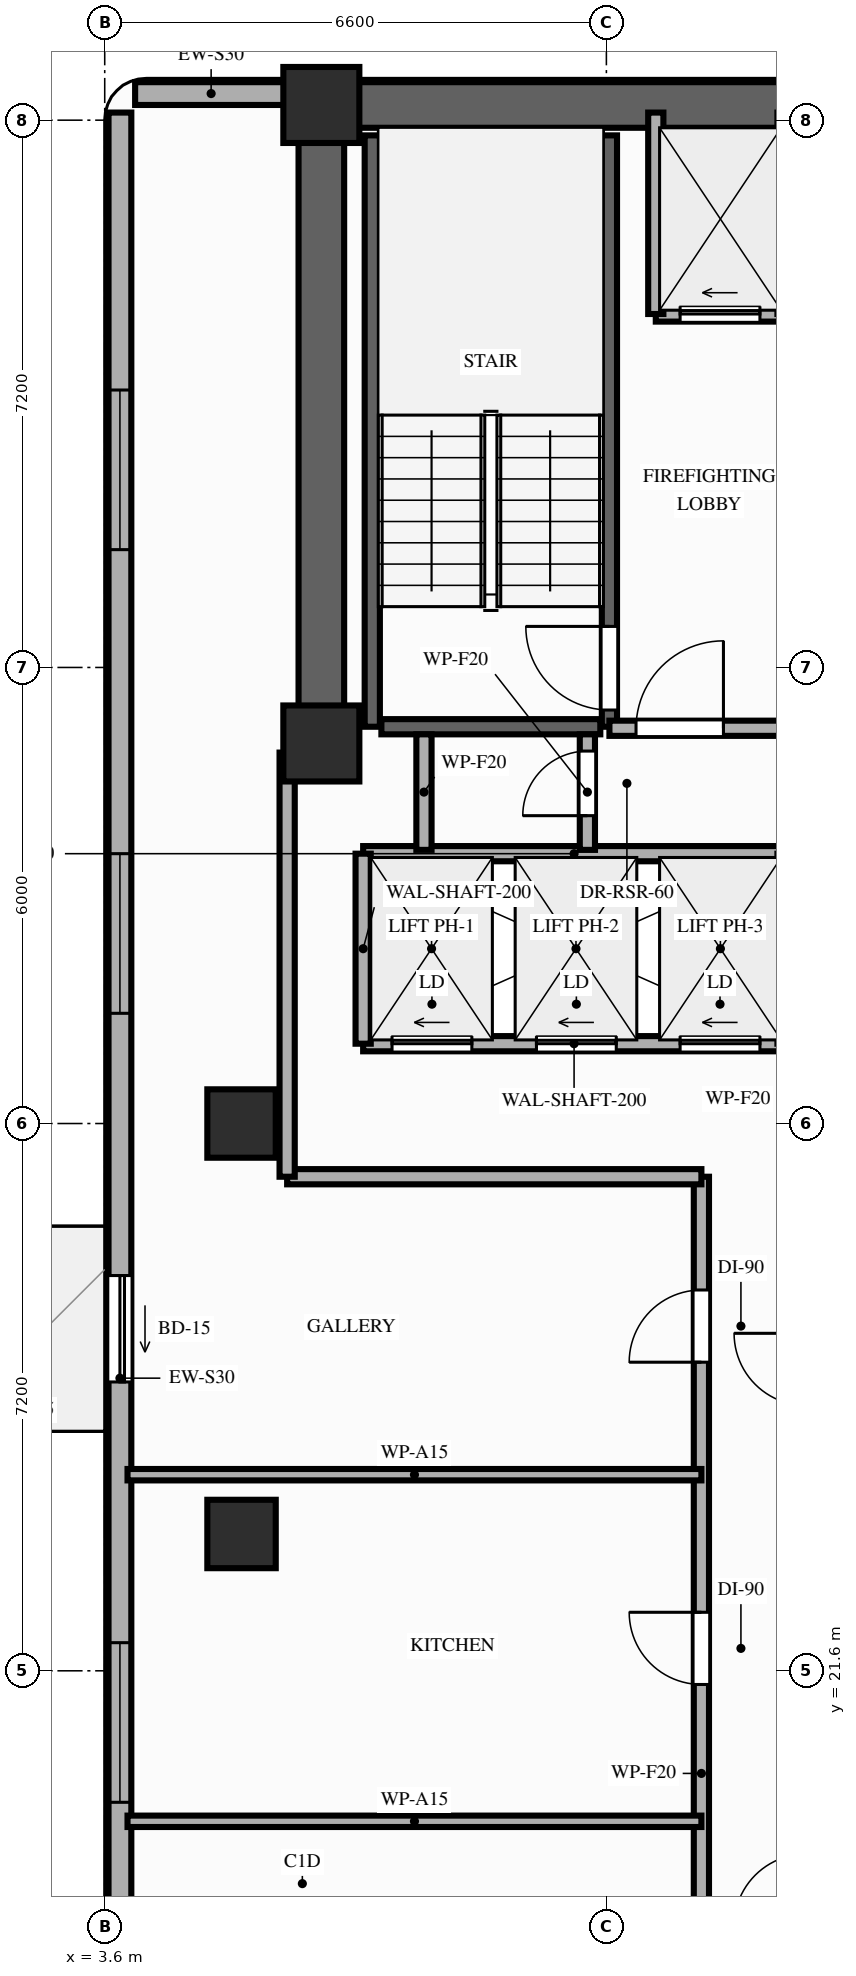
"""IFC4 building model, lengths in metres.
Left out: names, types, materials, properties, quantities, classifications, styles, units other than length and angle.
Written with IfcOpenShell. Run it as: python <this file> out.ifc"""

import sys

from ifc_helpers import new_model, si_unit, direction, frame, frame_2d, origin, origin_2d, place, context, subcontext, project, spatial, rectangle, extrude, element, fill, save


model = new_model("IFC4")
c1 = context("Model", 3, precision=1e-05, world=origin(), true_north=direction((0.0, 1.0)))
c2 = subcontext(c1, "Body", "Model", "MODEL_VIEW")
j1 = project(units=[si_unit("LENGTHUNIT", "METRE"), si_unit("PLANEANGLEUNIT", "RADIAN")], contexts=[c1])
p1 = place(None, origin())
s1 = spatial("IfcSite", under=j1, at=p1, CompositionType="ELEMENT")
p2 = place(p1, origin())
s2 = spatial("IfcBuilding", under=s1, at=p2, CompositionType="ELEMENT")
p3 = place(p2, frame((0.0, 0.0, 160.0)))
s3 = spatial("IfcBuildingStorey", under=s2, at=p3, CompositionType="ELEMENT", Elevation=160.0)
for number, where, z_axis, x_axis in (
    (1, (6.45, 33.8, 0.0), (0.0, 0.0, 1.0), (1.0, 0.0, 0.0)),
    (2, (6.45, 42.2, 0.0), (0.0, 0.0, 1.0), (1.0, 0.0, 0.0)),
):
    element("IfcColumn", number, at=place(p3, frame(where, z_axis=z_axis, x_axis=x_axis)), inside=s3, PredefinedType="COLUMN", context=c2, shape_type="SweptSolid", body=[
        extrude(rectangle(XDim=1.0, YDim=1.0, at=origin_2d()), origin(), (0.0, 0.0, 1.0), 3.2),
    ])
for number, where, z_axis, x_axis in (
    (3, (5.4, 23.4, 0.0), (0.0, 0.0, 1.0), (1.0, 0.0, 0.0)),
    (4, (5.4, 28.8, 0.0), (0.0, 0.0, 1.0), (1.0, 0.0, 0.0)),
):
    element("IfcColumn", number, at=place(p3, frame(where, z_axis=z_axis, x_axis=x_axis)), inside=s3, PredefinedType="COLUMN", context=c2, shape_type="SweptSolid", body=[
        extrude(rectangle(XDim=0.9, YDim=0.9, at=origin_2d()), origin(), (0.0, 0.0, 1.0), 3.2),
    ])
p4 = place(p3, frame((3.8, 42.1, 0.0), z_axis=(0.0, 0.0, 1.0), x_axis=(0.0, -1.0, 0.0)))
e5 = element("IfcWall", 5, at=p4, inside=s3, PredefinedType="STANDARD", context=c2, shape_type="SweptSolid", body=[
    extrude(rectangle(XDim=33.3, YDim=0.3, at=frame_2d((16.65, 0.0))), origin(), (0.0, 0.0, 1.0), 2.71),
])
p5 = place(p4, frame((15.3, 0.0, 0.0)))
e6 = element("IfcOpeningElement", 6, at=p5, cuts=e5, PredefinedType="OPENING", context=c2, shape_type="SweptSolid", body=[
    extrude(rectangle(XDim=1.4, YDim=2.1, at=frame_2d((0.7, 1.05))), frame((0.0, 0.16, 0.0), z_axis=(0.0, -1.0, 0.0), x_axis=(1.0, 0.0, 0.0)), (0.0, 0.0, 1.0), 0.32),
])
p6 = place(p4, frame((30.65, 0.0, 0.85)))
e7 = element("IfcOpeningElement", 7, at=p6, cuts=e5, PredefinedType="OPENING", context=c2, shape_type="SweptSolid", body=[
    extrude(rectangle(XDim=2.1, YDim=1.61, at=frame_2d((1.05, 0.805))), frame((0.0, 0.16, 0.0), z_axis=(0.0, -1.0, 0.0), x_axis=(1.0, 0.0, 0.0)), (0.0, 0.0, 1.0), 0.32),
])
p7 = place(p4, frame((20.13, 0.0, 0.85)))
e8 = element("IfcOpeningElement", 8, at=p7, cuts=e5, PredefinedType="OPENING", context=c2, shape_type="SweptSolid", body=[
    extrude(rectangle(XDim=2.1, YDim=1.61, at=frame_2d((1.05, 0.805))), frame((0.0, 0.16, 0.0), z_axis=(0.0, -1.0, 0.0), x_axis=(1.0, 0.0, 0.0)), (0.0, 0.0, 1.0), 0.32),
])
p8 = place(p4, frame((9.75, 0.0, 0.85)))
e9 = element("IfcOpeningElement", 9, at=p8, cuts=e5, PredefinedType="OPENING", context=c2, shape_type="SweptSolid", body=[
    extrude(rectangle(XDim=2.1, YDim=1.61, at=frame_2d((1.05, 0.805))), frame((0.0, 0.16, 0.0), z_axis=(0.0, -1.0, 0.0), x_axis=(1.0, 0.0, 0.0)), (0.0, 0.0, 1.0), 0.32),
])
p9 = place(p4, frame((3.65, 0.0, 0.85)))
e10 = element("IfcOpeningElement", 10, at=p9, cuts=e5, PredefinedType="OPENING", context=c2, shape_type="SweptSolid", body=[
    extrude(rectangle(XDim=2.1, YDim=1.61, at=frame_2d((1.05, 0.805))), frame((0.0, 0.16, 0.0), z_axis=(0.0, -1.0, 0.0), x_axis=(1.0, 0.0, 0.0)), (0.0, 0.0, 1.0), 0.32),
])
p10 = place(p3, frame((6.0, 42.35, 0.0), z_axis=(0.0, 0.0, 1.0), x_axis=(-1.0, 0.0, 0.0)))
e11 = element("IfcWall", 11, at=p10, inside=s3, PredefinedType="STANDARD", context=c2, shape_type="SweptSolid", body=[
    extrude(rectangle(XDim=2.0, YDim=0.3, at=frame_2d((1.0, 0.0))), origin(), (0.0, 0.0, 1.0), 3.02),
])
p11 = place(p3, frame((6.45, 42.2, 0.0), z_axis=(0.0, 0.0, 1.0), x_axis=(1.0, 0.0, 0.0)))
e12 = element("IfcWall", 12, at=p11, inside=s3, PredefinedType="SHEAR", context=c2, shape_type="SweptSolid", body=[
    extrude(rectangle(XDim=20.45, YDim=0.6, at=frame_2d((10.225, 0.0))), origin(), (0.0, 0.0, 1.0), 3.02),
])
p12 = place(p3, frame((6.45, 33.8, 0.0), z_axis=(0.0, 0.0, 1.0), x_axis=(0.0, 1.0, 0.0)))
e13 = element("IfcWall", 13, at=p12, inside=s3, PredefinedType="SHEAR", context=c2, shape_type="SweptSolid", body=[
    extrude(rectangle(XDim=7.95, YDim=0.6, at=frame_2d((3.975, 0.0))), origin(), (0.0, 0.0, 1.0), 3.02),
])
p13 = place(p3, frame((7.12, 34.02, 0.0), z_axis=(0.0, 0.0, 1.0), x_axis=(0.0, 1.0, 0.0)))
e14 = element("IfcWall", 14, at=p13, inside=s3, PredefinedType="SHEAR", context=c2, shape_type="SweptSolid", body=[
    extrude(rectangle(XDim=7.78, YDim=0.2, at=frame_2d((3.89, 0.0))), origin(), (0.0, 0.0, 1.0), 3.02),
])
p14 = place(p3, frame((10.24, 34.02, 0.0), z_axis=(0.0, 0.0, 1.0), x_axis=(0.0, 1.0, 0.0)))
e15 = element("IfcWall", 15, at=p14, inside=s3, PredefinedType="SHEAR", context=c2, shape_type="SweptSolid", body=[
    extrude(rectangle(XDim=7.78, YDim=0.2, at=frame_2d((3.89, 0.0))), origin(), (0.0, 0.0, 1.0), 3.02),
])
p15 = place(p14, frame((0.22, 0.0, 0.0)))
e16 = element("IfcOpeningElement", 16, at=p15, cuts=e15, PredefinedType="OPENING", context=c2, shape_type="SweptSolid", body=[
    extrude(rectangle(XDim=1.1, YDim=2.15, at=frame_2d((0.55, 1.075))), frame((0.0, 0.11, 0.0), z_axis=(0.0, -1.0, 0.0), x_axis=(1.0, 0.0, 0.0)), (0.0, 0.0, 1.0), 0.22),
])
p16 = place(p3, frame((7.24, 34.02, 0.0), z_axis=(0.0, 0.0, 1.0), x_axis=(1.0, 0.0, 0.0)))
e17 = element("IfcWall", 17, at=p16, inside=s3, PredefinedType="SHEAR", context=c2, shape_type="SweptSolid", body=[
    extrude(rectangle(XDim=2.88, YDim=0.2, at=frame_2d((1.44, 0.0))), origin(), (0.0, 0.0, 1.0), 3.02),
])
p17 = place(p3, frame((7.0, 29.85, 0.0), z_axis=(0.0, 0.0, 1.0), x_axis=(1.0, 0.0, 0.0)))
e18 = element("IfcWall", 18, at=p17, inside=s3, PredefinedType="MOVABLE", context=c2, shape_type="SweptSolid", body=[
    extrude(rectangle(XDim=5.55, YDim=0.2, at=frame_2d((2.775, 0.0))), origin(), (0.0, 0.0, 1.0), 3.02),
])
p18 = place(p17, frame((0.38, 0.0, 0.0)))
e19 = element("IfcOpeningElement", 19, at=p18, cuts=e18, PredefinedType="OPENING", context=c2, shape_type="SweptSolid", body=[
    extrude(rectangle(XDim=1.05, YDim=2.15, at=frame_2d((0.525, 1.075))), frame((0.0, 0.11, 0.0), z_axis=(0.0, -1.0, 0.0), x_axis=(1.0, 0.0, 0.0)), (0.0, 0.0, 1.0), 0.22),
])
p19 = place(p17, frame((2.28, 0.0, 0.0)))
e20 = element("IfcOpeningElement", 20, at=p19, cuts=e18, PredefinedType="OPENING", context=c2, shape_type="SweptSolid", body=[
    extrude(rectangle(XDim=1.05, YDim=2.15, at=frame_2d((0.525, 1.075))), frame((0.0, 0.11, 0.0), z_axis=(0.0, -1.0, 0.0), x_axis=(1.0, 0.0, 0.0)), (0.0, 0.0, 1.0), 0.22),
])
p20 = place(p17, frame((4.17, 0.0, 0.0)))
e21 = element("IfcOpeningElement", 21, at=p20, cuts=e18, PredefinedType="OPENING", context=c2, shape_type="SweptSolid", body=[
    extrude(rectangle(XDim=1.05, YDim=2.15, at=frame_2d((0.525, 1.075))), frame((0.0, 0.11, 0.0), z_axis=(0.0, -1.0, 0.0), x_axis=(1.0, 0.0, 0.0)), (0.0, 0.0, 1.0), 0.22),
])
p21 = place(p3, frame((7.0, 32.35, 0.0), z_axis=(0.0, 0.0, 1.0), x_axis=(1.0, 0.0, 0.0)))
e22 = element("IfcWall", 22, at=p21, inside=s3, PredefinedType="MOVABLE", context=c2, shape_type="SweptSolid", body=[
    extrude(rectangle(XDim=5.55, YDim=0.2, at=frame_2d((2.775, 0.0))), origin(), (0.0, 0.0, 1.0), 3.02),
])
p22 = place(p3, frame((7.0, 29.85, 0.0), z_axis=(0.0, 0.0, 1.0), x_axis=(0.0, 1.0, 0.0)))
e23 = element("IfcWall", 23, at=p22, inside=s3, PredefinedType="MOVABLE", context=c2, shape_type="SweptSolid", body=[
    extrude(rectangle(XDim=2.5, YDim=0.2, at=frame_2d((1.25, 0.0))), origin(), (0.0, 0.0, 1.0), 3.02),
])
p23 = place(p3, frame((10.85, 39.45, 0.0), z_axis=(0.0, 0.0, 1.0), x_axis=(1.0, 0.0, 0.0)))
e24 = element("IfcWall", 24, at=p23, inside=s3, PredefinedType="MOVABLE", context=c2, shape_type="SweptSolid", body=[
    extrude(rectangle(XDim=1.7, YDim=0.2, at=frame_2d((0.85, 0.0))), origin(), (0.0, 0.0, 1.0), 3.02),
])
p24 = place(p23, frame((0.32, 0.0, 0.0)))
e25 = element("IfcOpeningElement", 25, at=p24, cuts=e24, PredefinedType="OPENING", context=c2, shape_type="SweptSolid", body=[
    extrude(rectangle(XDim=1.05, YDim=2.15, at=frame_2d((0.525, 1.075))), frame((0.0, 0.11, 0.0), z_axis=(0.0, -1.0, 0.0), x_axis=(1.0, 0.0, 0.0)), (0.0, 0.0, 1.0), 0.22),
])
p25 = place(p3, frame((10.85, 39.45, 0.0), z_axis=(0.0, 0.0, 1.0), x_axis=(0.0, 1.0, 0.0)))
e26 = element("IfcWall", 26, at=p25, inside=s3, PredefinedType="MOVABLE", context=c2, shape_type="SweptSolid", body=[
    extrude(rectangle(XDim=2.65, YDim=0.2, at=frame_2d((1.325, 0.0))), origin(), (0.0, 0.0, 1.0), 2.46),
])
p26 = place(p3, frame((10.24, 34.0, 0.0), z_axis=(0.0, 0.0, 1.0), x_axis=(1.0, 0.0, 0.0)))
e27 = element("IfcWall", 27, at=p26, inside=s3, PredefinedType="PARTITIONING", context=c2, shape_type="SweptSolid", body=[
    extrude(rectangle(XDim=2.66, YDim=0.2, at=frame_2d((1.33, 0.0))), origin(), (0.0, 0.0, 1.0), 2.46),
])
p27 = place(p26, frame((0.35, 0.0, 0.0)))
e28 = element("IfcOpeningElement", 28, at=p27, cuts=e27, PredefinedType="OPENING", context=c2, shape_type="SweptSolid", body=[
    extrude(rectangle(XDim=1.15, YDim=2.15, at=frame_2d((0.575, 1.075))), frame((0.0, 0.11, 0.0), z_axis=(0.0, -1.0, 0.0), x_axis=(1.0, 0.0, 0.0)), (0.0, 0.0, 1.0), 0.22),
])
p28 = place(p3, frame((7.8, 32.4, 0.0), z_axis=(0.0, 0.0, 1.0), x_axis=(0.0, 1.0, 0.0)))
e29 = element("IfcWall", 29, at=p28, inside=s3, PredefinedType="PARTITIONING", context=c2, shape_type="SweptSolid", body=[
    extrude(rectangle(XDim=1.52, YDim=0.2, at=frame_2d((0.76, 0.0))), origin(), (0.0, 0.0, 1.0), 2.46),
])
p29 = place(p3, frame((9.95, 32.4, 0.0), z_axis=(0.0, 0.0, 1.0), x_axis=(0.0, 1.0, 0.0)))
e30 = element("IfcWall", 30, at=p29, inside=s3, PredefinedType="PARTITIONING", context=c2, shape_type="SweptSolid", body=[
    extrude(rectangle(XDim=1.52, YDim=0.2, at=frame_2d((0.76, 0.0))), origin(), (0.0, 0.0, 1.0), 2.46),
])
p30 = place(p29, frame((0.45, 0.0, 0.0)))
e31 = element("IfcOpeningElement", 31, at=p30, cuts=e30, PredefinedType="OPENING", context=c2, shape_type="SweptSolid", body=[
    extrude(rectangle(XDim=0.85, YDim=2.05, at=frame_2d((0.425, 1.025))), frame((0.0, 0.11, 0.0), z_axis=(0.0, -1.0, 0.0), x_axis=(1.0, 0.0, 0.0)), (0.0, 0.0, 1.0), 0.22),
])
p31 = place(p3, frame((11.45, 12.4, 0.0), z_axis=(0.0, 0.0, 1.0), x_axis=(0.0, 1.0, 0.0)))
e32 = element("IfcWall", 32, at=p31, inside=s3, PredefinedType="PARTITIONING", context=c2, shape_type="SweptSolid", body=[
    extrude(rectangle(XDim=15.7, YDim=0.2, at=frame_2d((7.85, 0.0))), origin(), (0.0, 0.0, 1.0), 2.46),
])
p32 = place(p31, frame((1.17, 0.0, 0.0)))
e33 = element("IfcOpeningElement", 33, at=p32, cuts=e32, PredefinedType="OPENING", context=c2, shape_type="SweptSolid", body=[
    extrude(rectangle(XDim=0.95, YDim=2.15, at=frame_2d((0.475, 1.075))), frame((0.0, 0.11, 0.0), z_axis=(0.0, -1.0, 0.0), x_axis=(1.0, 0.0, 0.0)), (0.0, 0.0, 1.0), 0.22),
])
p33 = place(p31, frame((4.78, 0.0, 0.0)))
e34 = element("IfcOpeningElement", 34, at=p33, cuts=e32, PredefinedType="OPENING", context=c2, shape_type="SweptSolid", body=[
    extrude(rectangle(XDim=0.95, YDim=2.15, at=frame_2d((0.475, 1.075))), frame((0.0, 0.11, 0.0), z_axis=(0.0, -1.0, 0.0), x_axis=(1.0, 0.0, 0.0)), (0.0, 0.0, 1.0), 0.22),
])
p34 = place(p31, frame((9.02, 0.0, 0.0)))
e35 = element("IfcOpeningElement", 35, at=p34, cuts=e32, PredefinedType="OPENING", context=c2, shape_type="SweptSolid", body=[
    extrude(rectangle(XDim=0.95, YDim=2.15, at=frame_2d((0.475, 1.075))), frame((0.0, 0.11, 0.0), z_axis=(0.0, -1.0, 0.0), x_axis=(1.0, 0.0, 0.0)), (0.0, 0.0, 1.0), 0.22),
])
p35 = place(p31, frame((13.26, 0.0, 0.0)))
e36 = element("IfcOpeningElement", 36, at=p35, cuts=e32, PredefinedType="OPENING", context=c2, shape_type="SweptSolid", body=[
    extrude(rectangle(XDim=0.95, YDim=2.15, at=frame_2d((0.475, 1.075))), frame((0.0, 0.11, 0.0), z_axis=(0.0, -1.0, 0.0), x_axis=(1.0, 0.0, 0.0)), (0.0, 0.0, 1.0), 0.22),
])
p36 = place(p3, frame((6.0, 28.1, 0.0), z_axis=(0.0, 0.0, 1.0), x_axis=(1.0, 0.0, 0.0)))
e37 = element("IfcWall", 37, at=p36, inside=s3, PredefinedType="PARTITIONING", context=c2, shape_type="SweptSolid", body=[
    extrude(rectangle(XDim=5.45, YDim=0.2, at=frame_2d((2.725, 0.0))), origin(), (0.0, 0.0, 1.0), 3.02),
])
p37 = place(p3, frame((6.0, 28.1, 0.0), z_axis=(0.0, 0.0, 1.0), x_axis=(0.0, 1.0, 0.0)))
e38 = element("IfcWall", 38, at=p37, inside=s3, PredefinedType="PARTITIONING", context=c2, shape_type="SweptSolid", body=[
    extrude(rectangle(XDim=5.58, YDim=0.2, at=frame_2d((2.79, 0.0))), origin(), (0.0, 0.0, 1.0), 2.46),
])
for number, where, z_axis, x_axis in (
    (39, (3.9, 19.62, 0.0), (0.0, 0.0, 1.0), (1.0, 0.0, 0.0)),
    (40, (3.9, 24.18, 0.0), (0.0, 0.0, 1.0), (1.0, 0.0, 0.0)),
):
    element("IfcWall", number, at=place(p3, frame(where, z_axis=z_axis, x_axis=x_axis)), inside=s3, PredefinedType="PARTITIONING", context=c2, shape_type="SweptSolid", body=[
        extrude(rectangle(XDim=7.55, YDim=0.15, at=frame_2d((3.775, 0.0))), origin(), (0.0, 0.0, 1.0), 2.46),
    ])
p38 = place(p5, origin())
e41 = element("IfcDoor", 41, at=p38, inside=s3, OperationType="SLIDING_TO_RIGHT", PredefinedType="DOOR", context=c2, shape_type="SweptSolid", body=[
    extrude(rectangle(XDim=1.4, YDim=2.1, at=frame_2d((0.7, 1.05))), frame((0.0, 0.025, 0.0), z_axis=(0.0, -1.0, 0.0), x_axis=(1.0, 0.0, 0.0)), (0.0, 0.0, 1.0), 0.05),
])
fill(e6, e41)
p39 = place(p7, origin())
e42 = element("IfcWindow", 42, at=p39, inside=s3, PartitioningType="SINGLE_PANEL", PredefinedType="WINDOW", context=c2, shape_type="SweptSolid", body=[
    extrude(rectangle(XDim=2.1, YDim=1.61, at=frame_2d((1.05, 0.805))), frame((0.0, 0.03, 0.0), z_axis=(0.0, -1.0, 0.0), x_axis=(1.0, 0.0, 0.0)), (0.0, 0.0, 1.0), 0.06),
])
fill(e8, e42)
p40 = place(p8, origin())
e43 = element("IfcWindow", 43, at=p40, inside=s3, PartitioningType="SINGLE_PANEL", PredefinedType="WINDOW", context=c2, shape_type="SweptSolid", body=[
    extrude(rectangle(XDim=2.1, YDim=1.61, at=frame_2d((1.05, 0.805))), frame((0.0, 0.03, 0.0), z_axis=(0.0, -1.0, 0.0), x_axis=(1.0, 0.0, 0.0)), (0.0, 0.0, 1.0), 0.06),
])
fill(e9, e43)
p41 = place(p9, origin())
e44 = element("IfcWindow", 44, at=p41, inside=s3, PartitioningType="SINGLE_PANEL", PredefinedType="WINDOW", context=c2, shape_type="SweptSolid", body=[
    extrude(rectangle(XDim=2.1, YDim=1.61, at=frame_2d((1.05, 0.805))), frame((0.0, 0.03, 0.0), z_axis=(0.0, -1.0, 0.0), x_axis=(1.0, 0.0, 0.0)), (0.0, 0.0, 1.0), 0.06),
])
fill(e10, e44)
p42 = place(p15, origin())
e45 = element("IfcDoor", 45, at=p42, inside=s3, OperationType="SINGLE_SWING_RIGHT", PredefinedType="DOOR", context=c2, shape_type="SweptSolid", body=[
    extrude(rectangle(XDim=1.1, YDim=2.15, at=frame_2d((0.55, 1.075))), frame((0.0, 0.025, 0.0), z_axis=(0.0, -1.0, 0.0), x_axis=(1.0, 0.0, 0.0)), (0.0, 0.0, 1.0), 0.05),
])
fill(e16, e45)
p43 = place(p18, origin())
e46 = element("IfcDoor", 46, at=p43, inside=s3, OperationType="SLIDING_TO_LEFT", PredefinedType="DOOR", context=c2, shape_type="SweptSolid", body=[
    extrude(rectangle(XDim=1.05, YDim=2.15, at=frame_2d((0.525, 1.075))), frame((0.0, 0.025, 0.0), z_axis=(0.0, -1.0, 0.0), x_axis=(1.0, 0.0, 0.0)), (0.0, 0.0, 1.0), 0.05),
])
fill(e19, e46)
p44 = place(p19, origin())
e47 = element("IfcDoor", 47, at=p44, inside=s3, OperationType="SLIDING_TO_LEFT", PredefinedType="DOOR", context=c2, shape_type="SweptSolid", body=[
    extrude(rectangle(XDim=1.05, YDim=2.15, at=frame_2d((0.525, 1.075))), frame((0.0, 0.025, 0.0), z_axis=(0.0, -1.0, 0.0), x_axis=(1.0, 0.0, 0.0)), (0.0, 0.0, 1.0), 0.05),
])
fill(e20, e47)
p45 = place(p20, origin())
e48 = element("IfcDoor", 48, at=p45, inside=s3, OperationType="SLIDING_TO_LEFT", PredefinedType="DOOR", context=c2, shape_type="SweptSolid", body=[
    extrude(rectangle(XDim=1.05, YDim=2.15, at=frame_2d((0.525, 1.075))), frame((0.0, 0.025, 0.0), z_axis=(0.0, -1.0, 0.0), x_axis=(1.0, 0.0, 0.0)), (0.0, 0.0, 1.0), 0.05),
])
fill(e21, e48)
p46 = place(p24, origin())
e49 = element("IfcDoor", 49, at=p46, inside=s3, OperationType="SLIDING_TO_LEFT", PredefinedType="DOOR", context=c2, shape_type="SweptSolid", body=[
    extrude(rectangle(XDim=1.05, YDim=2.15, at=frame_2d((0.525, 1.075))), frame((0.0, 0.025, 0.0), z_axis=(0.0, -1.0, 0.0), x_axis=(1.0, 0.0, 0.0)), (0.0, 0.0, 1.0), 0.05),
])
fill(e25, e49)
p47 = place(p27, origin())
e50 = element("IfcDoor", 50, at=p47, inside=s3, OperationType="SINGLE_SWING_RIGHT", PredefinedType="DOOR", context=c2, shape_type="SweptSolid", body=[
    extrude(rectangle(XDim=1.15, YDim=2.15, at=frame_2d((0.575, 1.075))), frame((0.0, 0.025, 0.0), z_axis=(0.0, -1.0, 0.0), x_axis=(1.0, 0.0, 0.0)), (0.0, 0.0, 1.0), 0.05),
])
fill(e28, e50)
p48 = place(p30, origin())
e51 = element("IfcDoor", 51, at=p48, inside=s3, OperationType="SINGLE_SWING_LEFT", PredefinedType="DOOR", context=c2, shape_type="SweptSolid", body=[
    extrude(rectangle(XDim=0.85, YDim=2.05, at=frame_2d((0.425, 1.025))), frame((0.0, 0.025, 0.0), z_axis=(0.0, -1.0, 0.0), x_axis=(1.0, 0.0, 0.0)), (0.0, 0.0, 1.0), 0.05),
])
fill(e31, e51)
p49 = place(p34, origin())
e52 = element("IfcDoor", 52, at=p49, inside=s3, OperationType="SINGLE_SWING_RIGHT", PredefinedType="DOOR", context=c2, shape_type="SweptSolid", body=[
    extrude(rectangle(XDim=0.95, YDim=2.15, at=frame_2d((0.475, 1.075))), frame((0.0, 0.025, 0.0), z_axis=(0.0, -1.0, 0.0), x_axis=(1.0, 0.0, 0.0)), (0.0, 0.0, 1.0), 0.05),
])
fill(e35, e52)
p50 = place(p35, origin())
e53 = element("IfcDoor", 53, at=p50, inside=s3, OperationType="SINGLE_SWING_LEFT", PredefinedType="DOOR", context=c2, shape_type="SweptSolid", body=[
    extrude(rectangle(XDim=0.95, YDim=2.15, at=frame_2d((0.475, 1.075))), frame((0.0, 0.025, 0.0), z_axis=(0.0, -1.0, 0.0), x_axis=(1.0, 0.0, 0.0)), (0.0, 0.0, 1.0), 0.05),
])
fill(e36, e53)
save(model, sys.argv[1])
